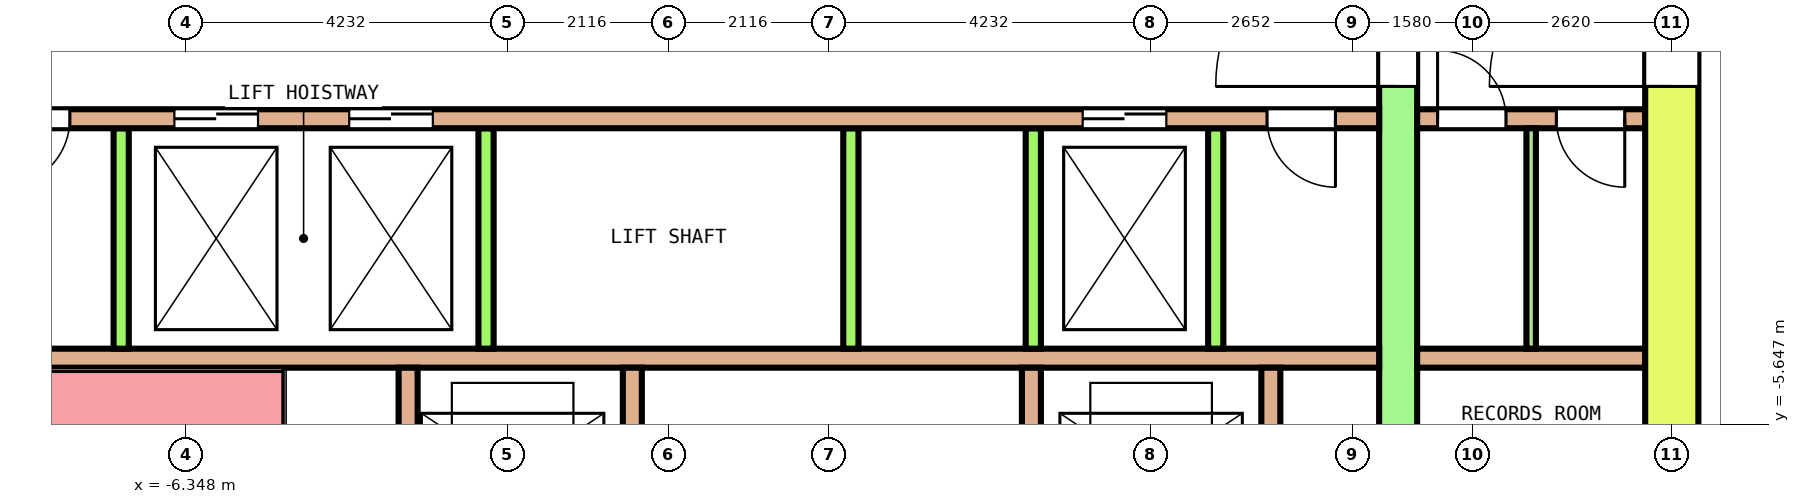
"""IFC4 building model, lengths in metres.
Left out: names, types, materials, properties, quantities, classifications, styles, units other than length and angle.
Written with IfcOpenShell. Run it as: python <this file> out.ifc"""

import sys

from ifc_helpers import new_model, si_unit, direction, frame, frame_2d, origin, place, context, subcontext, project, spatial, rectangle, extrude, element, fill, save


model = new_model("IFC4")
c1 = context("Model", 3, precision=1e-05, world=origin(), true_north=direction((0.0, 1.0)))
c2 = subcontext(c1, "Body", "Model", "MODEL_VIEW")
j1 = project(units=[si_unit("LENGTHUNIT", "METRE"), si_unit("PLANEANGLEUNIT", "RADIAN")], contexts=[c1])
p1 = place(None, origin())
s1 = spatial("IfcSite", under=j1, at=p1, CompositionType="ELEMENT")
p2 = place(p1, origin())
s2 = spatial("IfcBuilding", under=s1, at=p2, CompositionType="ELEMENT")
p3 = place(p2, frame((0.0, 0.0, 158.4)))
s3 = spatial("IfcBuildingStorey", under=s2, at=p3, CompositionType="ELEMENT", Elevation=158.4)
p4 = place(p3, frame((13.2, -7.75, 0.0), z_axis=(0.0, 0.0, 1.0), x_axis=(0.0, 1.0, 0.0)))
e1 = element("IfcWall", 1, at=p4, inside=s3, PredefinedType="SHEAR", context=c2, shape_type="SweptSolid", body=[
    extrude(rectangle(XDim=15.5, YDim=0.7, at=frame_2d((7.75, 0.0))), origin(), (0.0, 0.0, 1.0), 4.1),
])
p5 = place(p4, frame((6.55, 0.0, 0.0)))
e2 = element("IfcOpeningElement", 2, at=p5, cuts=e1, PredefinedType="OPENING", context=c2, shape_type="SweptSolid", body=[
    extrude(rectangle(XDim=2.4, YDim=2.1, at=frame_2d((1.2, 1.05))), frame((0.0, 0.36, 0.0), z_axis=(0.0, -1.0, 0.0), x_axis=(1.0, 0.0, 0.0)), (0.0, 0.0, 1.0), 0.72),
])
p6 = place(p4, frame((13.45, 0.0, 0.0)))
e3 = element("IfcOpeningElement", 3, at=p6, cuts=e1, PredefinedType="OPENING", context=c2, shape_type="SweptSolid", body=[
    extrude(rectangle(XDim=1.2, YDim=2.1, at=frame_2d((0.6, 1.05))), frame((0.0, 0.36, 0.0), z_axis=(0.0, -1.0, 0.0), x_axis=(1.0, 0.0, 0.0)), (0.0, 0.0, 1.0), 0.72),
])
p7 = place(p4, frame((0.95, 0.0, 0.0)))
e4 = element("IfcOpeningElement", 4, at=p7, cuts=e1, PredefinedType="OPENING", context=c2, shape_type="SweptSolid", body=[
    extrude(rectangle(XDim=1.0, YDim=2.1, at=frame_2d((0.5, 1.05))), frame((0.0, 0.36, 0.0), z_axis=(0.0, -1.0, 0.0), x_axis=(1.0, 0.0, 0.0)), (0.0, 0.0, 1.0), 0.72),
])
p8 = place(p3, frame((9.6, -7.75, 0.0), z_axis=(0.0, 0.0, 1.0), x_axis=(0.0, 1.0, 0.0)))
e5 = element("IfcWall", 5, at=p8, inside=s3, PredefinedType="SHEAR", context=c2, shape_type="SweptSolid", body=[
    extrude(rectangle(XDim=15.5, YDim=0.5, at=frame_2d((7.75, 0.0))), origin(), (0.0, 0.0, 1.0), 4.1),
])
p9 = place(p8, frame((6.55, 0.0, 0.0)))
e6 = element("IfcOpeningElement", 6, at=p9, cuts=e5, PredefinedType="OPENING", context=c2, shape_type="SweptSolid", body=[
    extrude(rectangle(XDim=2.4, YDim=2.1, at=frame_2d((1.2, 1.05))), frame((0.0, 0.26, 0.0), z_axis=(0.0, -1.0, 0.0), x_axis=(1.0, 0.0, 0.0)), (0.0, 0.0, 1.0), 0.52),
])
p10 = place(p8, frame((13.45, 0.0, 0.0)))
e7 = element("IfcOpeningElement", 7, at=p10, cuts=e5, PredefinedType="OPENING", context=c2, shape_type="SweptSolid", body=[
    extrude(rectangle(XDim=1.2, YDim=2.1, at=frame_2d((0.6, 1.05))), frame((0.0, 0.26, 0.0), z_axis=(0.0, -1.0, 0.0), x_axis=(1.0, 0.0, 0.0)), (0.0, 0.0, 1.0), 0.52),
])
p11 = place(p8, frame((0.95, 0.0, 0.0)))
e8 = element("IfcOpeningElement", 8, at=p11, cuts=e5, PredefinedType="OPENING", context=c2, shape_type="SweptSolid", body=[
    extrude(rectangle(XDim=1.0, YDim=2.1, at=frame_2d((0.5, 1.05))), frame((0.0, 0.26, 0.0), z_axis=(0.0, -1.0, 0.0), x_axis=(1.0, 0.0, 0.0)), (0.0, 0.0, 1.0), 0.52),
])
p12 = place(p3, frame((-9.35, -1.625, 0.0), z_axis=(0.0, 0.0, 1.0), x_axis=(1.0, 0.0, 0.0)))
e9 = element("IfcWall", 9, at=p12, inside=s3, PredefinedType="SOLIDWALL", context=c2, shape_type="SweptSolid", body=[
    extrude(rectangle(XDim=18.7, YDim=0.25, at=frame_2d((9.35, 0.0))), origin(), (0.0, 0.0, 1.0), 4.1),
])
p13 = place(p12, frame((2.85, 0.0, 0.0)))
e10 = element("IfcOpeningElement", 10, at=p13, cuts=e9, PredefinedType="OPENING", context=c2, shape_type="SweptSolid", body=[
    extrude(rectangle(XDim=1.1, YDim=2.1, at=frame_2d((0.55, 1.05))), frame((0.0, 0.135, 0.0), z_axis=(0.0, -1.0, 0.0), x_axis=(1.0, 0.0, 0.0)), (0.0, 0.0, 1.0), 0.27),
])
p14 = place(p12, frame((5.15, 0.0, 0.0)))
e11 = element("IfcOpeningElement", 11, at=p14, cuts=e9, PredefinedType="OPENING", context=c2, shape_type="SweptSolid", body=[
    extrude(rectangle(XDim=1.1, YDim=2.1, at=frame_2d((0.55, 1.05))), frame((0.0, 0.135, 0.0), z_axis=(0.0, -1.0, 0.0), x_axis=(1.0, 0.0, 0.0)), (0.0, 0.0, 1.0), 0.27),
])
p15 = place(p12, frame((14.8, 0.0, 0.0)))
e12 = element("IfcOpeningElement", 12, at=p15, cuts=e9, PredefinedType="OPENING", context=c2, shape_type="SweptSolid", body=[
    extrude(rectangle(XDim=1.1, YDim=2.1, at=frame_2d((0.55, 1.05))), frame((0.0, 0.135, 0.0), z_axis=(0.0, -1.0, 0.0), x_axis=(1.0, 0.0, 0.0)), (0.0, 0.0, 1.0), 0.27),
])
p16 = place(p12, frame((0.575, 0.0, 0.0)))
e13 = element("IfcOpeningElement", 13, at=p16, cuts=e9, PredefinedType="OPENING", context=c2, shape_type="SweptSolid", body=[
    extrude(rectangle(XDim=0.9, YDim=2.1, at=frame_2d((0.45, 1.05))), frame((0.0, 0.135, 0.0), z_axis=(0.0, -1.0, 0.0), x_axis=(1.0, 0.0, 0.0)), (0.0, 0.0, 1.0), 0.27),
])
p17 = place(p12, frame((17.225, 0.0, 0.0)))
e14 = element("IfcOpeningElement", 14, at=p17, cuts=e9, PredefinedType="OPENING", context=c2, shape_type="SweptSolid", body=[
    extrude(rectangle(XDim=0.9, YDim=2.1, at=frame_2d((0.45, 1.05))), frame((0.0, 0.135, 0.0), z_axis=(0.0, -1.0, 0.0), x_axis=(1.0, 0.0, 0.0)), (0.0, 0.0, 1.0), 0.27),
])
p18 = place(p3, frame((9.85, -1.625, 0.0), z_axis=(0.0, 0.0, 1.0), x_axis=(1.0, 0.0, 0.0)))
e15 = element("IfcWall", 15, at=p18, inside=s3, PredefinedType="SOLIDWALL", context=c2, shape_type="SweptSolid", body=[
    extrude(rectangle(XDim=3.0, YDim=0.25, at=frame_2d((1.5, 0.0))), origin(), (0.0, 0.0, 1.0), 4.1),
])
p19 = place(p18, frame((0.269, 0.0, 0.0)))
e16 = element("IfcOpeningElement", 16, at=p19, cuts=e15, PredefinedType="OPENING", context=c2, shape_type="SweptSolid", body=[
    extrude(rectangle(XDim=0.9, YDim=2.1, at=frame_2d((0.45, 1.05))), frame((0.0, 0.135, 0.0), z_axis=(0.0, -1.0, 0.0), x_axis=(1.0, 0.0, 0.0)), (0.0, 0.0, 1.0), 0.27),
])
p20 = place(p18, frame((1.831, 0.0, 0.0)))
e17 = element("IfcOpeningElement", 17, at=p20, cuts=e15, PredefinedType="OPENING", context=c2, shape_type="SweptSolid", body=[
    extrude(rectangle(XDim=0.9, YDim=2.1, at=frame_2d((0.45, 1.05))), frame((0.0, 0.135, 0.0), z_axis=(0.0, -1.0, 0.0), x_axis=(1.0, 0.0, 0.0)), (0.0, 0.0, 1.0), 0.27),
])
p21 = place(p3, frame((-9.35, -4.775, 0.0), z_axis=(0.0, 0.0, 1.0), x_axis=(1.0, 0.0, 0.0)))
e18 = element("IfcWall", 18, at=p21, inside=s3, PredefinedType="SOLIDWALL", context=c2, shape_type="SweptSolid", body=[
    extrude(rectangle(XDim=18.7, YDim=0.25, at=frame_2d((9.35, 0.0))), origin(), (0.0, 0.0, 1.0), 4.1),
])
p22 = place(p3, frame((9.85, -4.775, 0.0), z_axis=(0.0, 0.0, 1.0), x_axis=(1.0, 0.0, 0.0)))
e19 = element("IfcWall", 19, at=p22, inside=s3, PredefinedType="SOLIDWALL", context=c2, shape_type="SweptSolid", body=[
    extrude(rectangle(XDim=3.0, YDim=0.25, at=frame_2d((1.5, 0.0))), origin(), (0.0, 0.0, 1.0), 4.1),
])
for number, where, z_axis, x_axis in (
    (20, (-7.2, -4.65, 0.0), (0.0, 0.0, 1.0), (0.0, 1.0, 0.0)),
    (21, (-2.4, -4.65, 0.0), (0.0, 0.0, 1.0), (0.0, 1.0, 0.0)),
    (22, (2.4, -4.65, 0.0), (0.0, 0.0, 1.0), (0.0, 1.0, 0.0)),
    (23, (4.8, -4.65, 0.0), (0.0, 0.0, 1.0), (0.0, 1.0, 0.0)),
    (24, (7.2, -4.65, 0.0), (0.0, 0.0, 1.0), (0.0, 1.0, 0.0)),
):
    element("IfcWall", number, at=place(p3, frame(where, z_axis=z_axis, x_axis=x_axis)), inside=s3, PredefinedType="SOLIDWALL", context=c2, shape_type="SweptSolid", body=[
        extrude(rectangle(XDim=2.9, YDim=0.2, at=frame_2d((1.45, 0.0))), origin(), (0.0, 0.0, 1.0), 4.1),
    ])
p23 = place(p3, frame((-3.425, -7.75, 0.0), z_axis=(0.0, 0.0, 1.0), x_axis=(0.0, 1.0, 0.0)))
e25 = element("IfcWall", 25, at=p23, inside=s3, PredefinedType="SOLIDWALL", context=c2, shape_type="SweptSolid", body=[
    extrude(rectangle(XDim=2.85, YDim=0.25, at=frame_2d((1.425, 0.0))), origin(), (0.0, 0.0, 1.0), 4.1),
])
p24 = place(p3, frame((-0.475, -7.75, 0.0), z_axis=(0.0, 0.0, 1.0), x_axis=(0.0, 1.0, 0.0)))
e26 = element("IfcWall", 26, at=p24, inside=s3, PredefinedType="SOLIDWALL", context=c2, shape_type="SweptSolid", body=[
    extrude(rectangle(XDim=2.85, YDim=0.25, at=frame_2d((1.425, 0.0))), origin(), (0.0, 0.0, 1.0), 4.1),
])
p25 = place(p24, frame((0.875, 0.0, 0.0)))
e27 = element("IfcOpeningElement", 27, at=p25, cuts=e26, PredefinedType="OPENING", context=c2, shape_type="SweptSolid", body=[
    extrude(rectangle(XDim=1.1, YDim=2.1, at=frame_2d((0.55, 1.05))), frame((0.0, 0.135, 0.0), z_axis=(0.0, -1.0, 0.0), x_axis=(1.0, 0.0, 0.0)), (0.0, 0.0, 1.0), 0.27),
])
p26 = place(p3, frame((4.775, -7.75, 0.0), z_axis=(0.0, 0.0, 1.0), x_axis=(0.0, 1.0, 0.0)))
e28 = element("IfcWall", 28, at=p26, inside=s3, PredefinedType="SOLIDWALL", context=c2, shape_type="SweptSolid", body=[
    extrude(rectangle(XDim=2.85, YDim=0.25, at=frame_2d((1.425, 0.0))), origin(), (0.0, 0.0, 1.0), 4.1),
])
p27 = place(p26, frame((0.875, 0.0, 0.0)))
e29 = element("IfcOpeningElement", 29, at=p27, cuts=e28, PredefinedType="OPENING", context=c2, shape_type="SweptSolid", body=[
    extrude(rectangle(XDim=1.1, YDim=2.1, at=frame_2d((0.55, 1.05))), frame((0.0, 0.135, 0.0), z_axis=(0.0, -1.0, 0.0), x_axis=(1.0, 0.0, 0.0)), (0.0, 0.0, 1.0), 0.27),
])
p28 = place(p3, frame((7.925, -7.75, 0.0), z_axis=(0.0, 0.0, 1.0), x_axis=(0.0, 1.0, 0.0)))
e30 = element("IfcWall", 30, at=p28, inside=s3, PredefinedType="SOLIDWALL", context=c2, shape_type="SweptSolid", body=[
    extrude(rectangle(XDim=2.85, YDim=0.25, at=frame_2d((1.425, 0.0))), origin(), (0.0, 0.0, 1.0), 4.1),
])
p29 = place(p3, frame((11.35, -4.65, 0.0), z_axis=(0.0, 0.0, 1.0), x_axis=(0.0, 1.0, 0.0)))
e31 = element("IfcWall", 31, at=p29, inside=s3, PredefinedType="PARTITIONING", context=c2, shape_type="SweptSolid", body=[
    extrude(rectangle(XDim=2.9, YDim=0.125, at=frame_2d((1.45, 0.0))), origin(), (0.0, 0.0, 1.0), 4.1),
])
p30 = place(p13, origin())
e32 = element("IfcDoor", 32, at=p30, inside=s3, OperationType="DOUBLE_DOOR_SLIDING", PredefinedType="DOOR", context=c2, shape_type="SweptSolid", body=[
    extrude(rectangle(XDim=1.1, YDim=2.1, at=frame_2d((0.55, 1.05))), frame((0.0, 0.075, 0.0), z_axis=(0.0, -1.0, 0.0), x_axis=(1.0, 0.0, 0.0)), (0.0, 0.0, 1.0), 0.15),
])
fill(e10, e32)
p31 = place(p14, origin())
e33 = element("IfcDoor", 33, at=p31, inside=s3, OperationType="DOUBLE_DOOR_SLIDING", PredefinedType="DOOR", context=c2, shape_type="SweptSolid", body=[
    extrude(rectangle(XDim=1.1, YDim=2.1, at=frame_2d((0.55, 1.05))), frame((0.0, 0.075, 0.0), z_axis=(0.0, -1.0, 0.0), x_axis=(1.0, 0.0, 0.0)), (0.0, 0.0, 1.0), 0.15),
])
fill(e11, e33)
p32 = place(p15, origin())
e34 = element("IfcDoor", 34, at=p32, inside=s3, OperationType="DOUBLE_DOOR_SLIDING", PredefinedType="DOOR", context=c2, shape_type="SweptSolid", body=[
    extrude(rectangle(XDim=1.1, YDim=2.1, at=frame_2d((0.55, 1.05))), frame((0.0, 0.075, 0.0), z_axis=(0.0, -1.0, 0.0), x_axis=(1.0, 0.0, 0.0)), (0.0, 0.0, 1.0), 0.15),
])
fill(e12, e34)
p33 = place(p9, origin())
e35 = element("IfcDoor", 35, at=p33, inside=s3, OperationType="DOUBLE_DOOR_SINGLE_SWING", PredefinedType="DOOR", context=c2, shape_type="SweptSolid", body=[
    extrude(rectangle(XDim=2.4, YDim=2.1, at=frame_2d((1.2, 1.05))), frame((0.0, 0.2, 0.0), z_axis=(0.0, -1.0, 0.0), x_axis=(1.0, 0.0, 0.0)), (0.0, 0.0, 1.0), 0.4),
])
fill(e6, e35)
p34 = place(p5, origin())
e36 = element("IfcDoor", 36, at=p34, inside=s3, OperationType="DOUBLE_DOOR_SINGLE_SWING", PredefinedType="DOOR", context=c2, shape_type="SweptSolid", body=[
    extrude(rectangle(XDim=2.4, YDim=2.1, at=frame_2d((1.2, 1.05))), frame((0.0, 0.3, 0.0), z_axis=(0.0, -1.0, 0.0), x_axis=(1.0, 0.0, 0.0)), (0.0, 0.0, 1.0), 0.6),
])
fill(e2, e36)
p35 = place(p16, origin())
e37 = element("IfcDoor", 37, at=p35, inside=s3, OperationType="SINGLE_SWING_LEFT", PredefinedType="DOOR", context=c2, shape_type="SweptSolid", body=[
    extrude(rectangle(XDim=0.9, YDim=2.1, at=frame_2d((0.45, 1.05))), frame((0.0, 0.075, 0.0), z_axis=(0.0, -1.0, 0.0), x_axis=(1.0, 0.0, 0.0)), (0.0, 0.0, 1.0), 0.15),
])
fill(e13, e37)
p36 = place(p17, origin())
e38 = element("IfcDoor", 38, at=p36, inside=s3, OperationType="SINGLE_SWING_RIGHT", PredefinedType="DOOR", context=c2, shape_type="SweptSolid", body=[
    extrude(rectangle(XDim=0.9, YDim=2.1, at=frame_2d((0.45, 1.05))), frame((0.0, 0.075, 0.0), z_axis=(0.0, -1.0, 0.0), x_axis=(1.0, 0.0, 0.0)), (0.0, 0.0, 1.0), 0.15),
])
fill(e14, e38)
p37 = place(p19, origin())
e39 = element("IfcDoor", 39, at=p37, inside=s3, OperationType="SINGLE_SWING_LEFT", PredefinedType="DOOR", context=c2, shape_type="SweptSolid", body=[
    extrude(rectangle(XDim=0.9, YDim=2.1, at=frame_2d((0.45, 1.05))), frame((0.0, 0.075, 0.0), z_axis=(0.0, -1.0, 0.0), x_axis=(1.0, 0.0, 0.0)), (0.0, 0.0, 1.0), 0.15),
])
fill(e16, e39)
p38 = place(p20, origin())
e40 = element("IfcDoor", 40, at=p38, inside=s3, OperationType="SINGLE_SWING_RIGHT", PredefinedType="DOOR", context=c2, shape_type="SweptSolid", body=[
    extrude(rectangle(XDim=0.9, YDim=2.1, at=frame_2d((0.45, 1.05))), frame((0.0, 0.075, 0.0), z_axis=(0.0, -1.0, 0.0), x_axis=(1.0, 0.0, 0.0)), (0.0, 0.0, 1.0), 0.15),
])
fill(e17, e40)
save(model, sys.argv[1])
